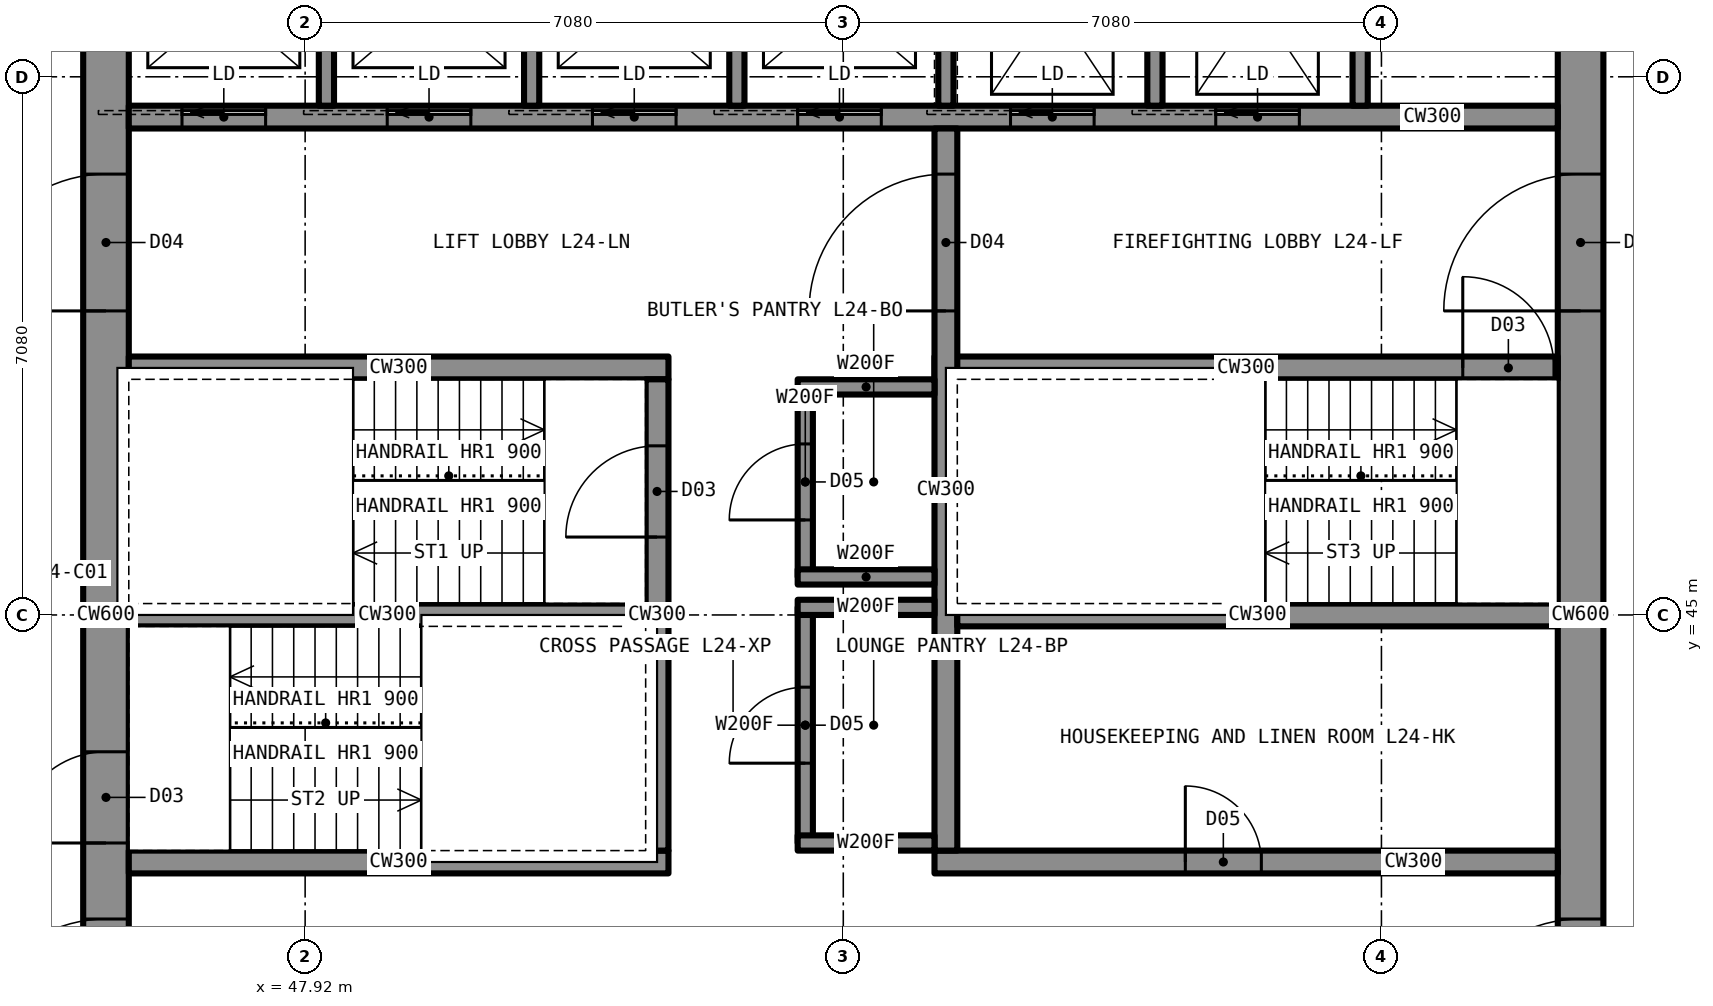
"""IFC4 building model, lengths in metres.
Left out: names, types, materials, properties, quantities, classifications, styles, units other than length and angle.
Written with IfcOpenShell. Run it as: python <this file> out.ifc"""

import sys

from ifc_helpers import new_model, si_unit, direction, frame, frame_2d, origin, place, context, subcontext, project, spatial, rectangle, extrude, element, fill, save


model = new_model("IFC4")
c1 = context("Model", 3, precision=1e-05, world=origin(), true_north=direction((0.0, 1.0)))
c2 = subcontext(c1, "Body", "Model", "MODEL_VIEW")
j1 = project(units=[si_unit("LENGTHUNIT", "METRE"), si_unit("PLANEANGLEUNIT", "RADIAN")], contexts=[c1])
p1 = place(None, origin())
s1 = spatial("IfcSite", under=j1, at=p1, CompositionType="ELEMENT")
p2 = place(p1, origin())
s2 = spatial("IfcBuilding", under=s1, at=p2, CompositionType="ELEMENT")
p3 = place(p2, frame((0.0, 0.0, 93.4)))
s3 = spatial("IfcBuildingStorey", under=s2, at=p3, CompositionType="ELEMENT", Elevation=93.4)
p4 = place(p3, frame((64.7, 35.6, 0.0), z_axis=(0.0, 0.0, 1.0), x_axis=(0.0, 1.0, 0.0)))
e1 = element("IfcWall", 1, at=p4, inside=s3, PredefinedType="SHEAR", context=c2, shape_type="SweptSolid", body=[
    extrude(rectangle(XDim=18.8, YDim=0.6, at=frame_2d((9.4, 0.0))), origin(), (0.0, 0.0, 1.0), 3.5),
])
p5 = place(p4, frame((13.4, 0.0, 0.0)))
e2 = element("IfcOpeningElement", 2, at=p5, cuts=e1, PredefinedType="OPENING", context=c2, shape_type="SweptSolid", body=[
    extrude(rectangle(XDim=1.8, YDim=2.2, at=frame_2d((0.9, 1.1))), frame((0.0, 0.31, 0.0), z_axis=(0.0, -1.0, 0.0), x_axis=(1.0, 0.0, 0.0)), (0.0, 0.0, 1.0), 0.62),
])
p6 = place(p4, frame((3.6, 0.0, 0.0)))
e3 = element("IfcOpeningElement", 3, at=p6, cuts=e1, PredefinedType="OPENING", context=c2, shape_type="SweptSolid", body=[
    extrude(rectangle(XDim=1.8, YDim=2.2, at=frame_2d((0.9, 1.1))), frame((0.0, 0.31, 0.0), z_axis=(0.0, -1.0, 0.0), x_axis=(1.0, 0.0, 0.0)), (0.0, 0.0, 1.0), 0.62),
])
p7 = place(p3, frame((45.3, 35.6, 0.0), z_axis=(0.0, 0.0, 1.0), x_axis=(0.0, 1.0, 0.0)))
e4 = element("IfcWall", 4, at=p7, inside=s3, PredefinedType="SHEAR", context=c2, shape_type="SweptSolid", body=[
    extrude(rectangle(XDim=18.8, YDim=0.6, at=frame_2d((9.4, 0.0))), origin(), (0.0, 0.0, 1.0), 3.5),
])
p8 = place(p7, frame((13.4, 0.0, 0.0)))
e5 = element("IfcOpeningElement", 5, at=p8, cuts=e4, PredefinedType="OPENING", context=c2, shape_type="SweptSolid", body=[
    extrude(rectangle(XDim=1.8, YDim=2.2, at=frame_2d((0.9, 1.1))), frame((0.0, 0.31, 0.0), z_axis=(0.0, -1.0, 0.0), x_axis=(1.0, 0.0, 0.0)), (0.0, 0.0, 1.0), 0.62),
])
p9 = place(p7, frame((3.6, 0.0, 0.0)))
e6 = element("IfcOpeningElement", 6, at=p9, cuts=e4, PredefinedType="OPENING", context=c2, shape_type="SweptSolid", body=[
    extrude(rectangle(XDim=1.8, YDim=2.2, at=frame_2d((0.9, 1.1))), frame((0.0, 0.31, 0.0), z_axis=(0.0, -1.0, 0.0), x_axis=(1.0, 0.0, 0.0)), (0.0, 0.0, 1.0), 0.62),
])
p10 = place(p7, frame((6.4, 0.0, 0.0)))
e7 = element("IfcOpeningElement", 7, at=p10, cuts=e4, PredefinedType="OPENING", context=c2, shape_type="SweptSolid", body=[
    extrude(rectangle(XDim=1.2, YDim=2.2, at=frame_2d((0.6, 1.1))), frame((0.0, 0.31, 0.0), z_axis=(0.0, -1.0, 0.0), x_axis=(1.0, 0.0, 0.0)), (0.0, 0.0, 1.0), 0.62),
])
p11 = place(p3, frame((45.6, 51.55, 0.0), z_axis=(0.0, 0.0, 1.0), x_axis=(1.0, 0.0, 0.0)))
e8 = element("IfcWall", 8, at=p11, inside=s3, PredefinedType="SHEAR", context=c2, shape_type="SweptSolid", body=[
    extrude(rectangle(XDim=18.8, YDim=0.3, at=frame_2d((9.4, 0.0))), origin(), (0.0, 0.0, 1.0), 3.5),
])
p12 = place(p11, frame((0.7, 0.0, 0.0)))
e9 = element("IfcOpeningElement", 9, at=p12, cuts=e8, PredefinedType="OPENING", context=c2, shape_type="SweptSolid", body=[
    extrude(rectangle(XDim=1.1, YDim=2.2, at=frame_2d((0.55, 1.1))), frame((0.0, 0.16, 0.0), z_axis=(0.0, -1.0, 0.0), x_axis=(1.0, 0.0, 0.0)), (0.0, 0.0, 1.0), 0.32),
])
p13 = place(p11, frame((3.4, 0.0, 0.0)))
e10 = element("IfcOpeningElement", 10, at=p13, cuts=e8, PredefinedType="OPENING", context=c2, shape_type="SweptSolid", body=[
    extrude(rectangle(XDim=1.1, YDim=2.2, at=frame_2d((0.55, 1.1))), frame((0.0, 0.16, 0.0), z_axis=(0.0, -1.0, 0.0), x_axis=(1.0, 0.0, 0.0)), (0.0, 0.0, 1.0), 0.32),
])
p14 = place(p11, frame((6.1, 0.0, 0.0)))
e11 = element("IfcOpeningElement", 11, at=p14, cuts=e8, PredefinedType="OPENING", context=c2, shape_type="SweptSolid", body=[
    extrude(rectangle(XDim=1.1, YDim=2.2, at=frame_2d((0.55, 1.1))), frame((0.0, 0.16, 0.0), z_axis=(0.0, -1.0, 0.0), x_axis=(1.0, 0.0, 0.0)), (0.0, 0.0, 1.0), 0.32),
])
p15 = place(p11, frame((8.8, 0.0, 0.0)))
e12 = element("IfcOpeningElement", 12, at=p15, cuts=e8, PredefinedType="OPENING", context=c2, shape_type="SweptSolid", body=[
    extrude(rectangle(XDim=1.1, YDim=2.2, at=frame_2d((0.55, 1.1))), frame((0.0, 0.16, 0.0), z_axis=(0.0, -1.0, 0.0), x_axis=(1.0, 0.0, 0.0)), (0.0, 0.0, 1.0), 0.32),
])
p16 = place(p11, frame((11.6, 0.0, 0.0)))
e13 = element("IfcOpeningElement", 13, at=p16, cuts=e8, PredefinedType="OPENING", context=c2, shape_type="SweptSolid", body=[
    extrude(rectangle(XDim=1.1, YDim=2.2, at=frame_2d((0.55, 1.1))), frame((0.0, 0.16, 0.0), z_axis=(0.0, -1.0, 0.0), x_axis=(1.0, 0.0, 0.0)), (0.0, 0.0, 1.0), 0.32),
])
p17 = place(p11, frame((14.3, 0.0, 0.0)))
e14 = element("IfcOpeningElement", 14, at=p17, cuts=e8, PredefinedType="OPENING", context=c2, shape_type="SweptSolid", body=[
    extrude(rectangle(XDim=1.1, YDim=2.2, at=frame_2d((0.55, 1.1))), frame((0.0, 0.16, 0.0), z_axis=(0.0, -1.0, 0.0), x_axis=(1.0, 0.0, 0.0)), (0.0, 0.0, 1.0), 0.32),
])
p18 = place(p3, frame((45.6, 48.25, 0.0), z_axis=(0.0, 0.0, 1.0), x_axis=(1.0, 0.0, 0.0)))
e15 = element("IfcWall", 15, at=p18, inside=s3, PredefinedType="SHEAR", context=c2, shape_type="SweptSolid", body=[
    extrude(rectangle(XDim=7.1, YDim=0.3, at=frame_2d((3.55, 0.0))), origin(), (0.0, 0.0, 1.0), 3.5),
])
p19 = place(p3, frame((56.2, 48.25, 0.0), z_axis=(0.0, 0.0, 1.0), x_axis=(1.0, 0.0, 0.0)))
e16 = element("IfcWall", 16, at=p19, inside=s3, PredefinedType="SHEAR", context=c2, shape_type="SweptSolid", body=[
    extrude(rectangle(XDim=8.2, YDim=0.3, at=frame_2d((4.1, 0.0))), origin(), (0.0, 0.0, 1.0), 3.5),
])
p20 = place(p19, frame((6.95, 0.0, 0.0)))
e17 = element("IfcOpeningElement", 17, at=p20, cuts=e16, PredefinedType="OPENING", context=c2, shape_type="SweptSolid", body=[
    extrude(rectangle(XDim=1.2, YDim=2.2, at=frame_2d((0.6, 1.1))), frame((0.0, 0.16, 0.0), z_axis=(0.0, -1.0, 0.0), x_axis=(1.0, 0.0, 0.0)), (0.0, 0.0, 1.0), 0.32),
])
p21 = place(p3, frame((45.6, 41.75, 0.0), z_axis=(0.0, 0.0, 1.0), x_axis=(1.0, 0.0, 0.0)))
e18 = element("IfcWall", 18, at=p21, inside=s3, PredefinedType="SHEAR", context=c2, shape_type="SweptSolid", body=[
    extrude(rectangle(XDim=7.1, YDim=0.3, at=frame_2d((3.55, 0.0))), origin(), (0.0, 0.0, 1.0), 3.5),
])
p22 = place(p3, frame((56.2, 41.75, 0.0), z_axis=(0.0, 0.0, 1.0), x_axis=(1.0, 0.0, 0.0)))
e19 = element("IfcWall", 19, at=p22, inside=s3, PredefinedType="SHEAR", context=c2, shape_type="SweptSolid", body=[
    extrude(rectangle(XDim=8.2, YDim=0.3, at=frame_2d((4.1, 0.0))), origin(), (0.0, 0.0, 1.0), 3.5),
])
p23 = place(p22, frame((3.3, 0.0, 0.0)))
e20 = element("IfcOpeningElement", 20, at=p23, cuts=e19, PredefinedType="OPENING", context=c2, shape_type="SweptSolid", body=[
    extrude(rectangle(XDim=1.0, YDim=2.1, at=frame_2d((0.5, 1.05))), frame((0.0, 0.16, 0.0), z_axis=(0.0, -1.0, 0.0), x_axis=(1.0, 0.0, 0.0)), (0.0, 0.0, 1.0), 0.32),
])
p24 = place(p3, frame((52.55, 41.9, 0.0), z_axis=(0.0, 0.0, 1.0), x_axis=(0.0, 1.0, 0.0)))
e21 = element("IfcWall", 21, at=p24, inside=s3, PredefinedType="SHEAR", context=c2, shape_type="SweptSolid", body=[
    extrude(rectangle(XDim=6.2, YDim=0.3, at=frame_2d((3.1, 0.0))), origin(), (0.0, 0.0, 1.0), 3.5),
])
p25 = place(p24, frame((4.125, 0.0, 0.0)))
e22 = element("IfcOpeningElement", 22, at=p25, cuts=e21, PredefinedType="OPENING", context=c2, shape_type="SweptSolid", body=[
    extrude(rectangle(XDim=1.2, YDim=2.2, at=frame_2d((0.6, 1.1))), frame((0.0, 0.16, 0.0), z_axis=(0.0, -1.0, 0.0), x_axis=(1.0, 0.0, 0.0)), (0.0, 0.0, 1.0), 0.32),
])
p26 = place(p3, frame((56.35, 41.9, 0.0), z_axis=(0.0, 0.0, 1.0), x_axis=(0.0, 1.0, 0.0)))
e23 = element("IfcWall", 23, at=p26, inside=s3, PredefinedType="SHEAR", context=c2, shape_type="SweptSolid", body=[
    extrude(rectangle(XDim=9.5, YDim=0.3, at=frame_2d((4.75, 0.0))), origin(), (0.0, 0.0, 1.0), 3.5),
])
p27 = place(p26, frame((7.1, 0.0, 0.0)))
e24 = element("IfcOpeningElement", 24, at=p27, cuts=e23, PredefinedType="OPENING", context=c2, shape_type="SweptSolid", body=[
    extrude(rectangle(XDim=1.8, YDim=2.2, at=frame_2d((0.9, 1.1))), frame((0.0, 0.16, 0.0), z_axis=(0.0, -1.0, 0.0), x_axis=(1.0, 0.0, 0.0)), (0.0, 0.0, 1.0), 0.32),
])
p28 = place(p3, frame((45.6, 45.0, 0.0), z_axis=(0.0, 0.0, 1.0), x_axis=(1.0, 0.0, 0.0)))
e25 = element("IfcWall", 25, at=p28, inside=s3, PredefinedType="SHEAR", context=c2, shape_type="SweptSolid", body=[
    extrude(rectangle(XDim=6.8, YDim=0.3, at=frame_2d((3.4, 0.0))), origin(), (0.0, 0.0, 1.0), 3.5),
])
p29 = place(p3, frame((56.5, 45.0, 0.0), z_axis=(0.0, 0.0, 1.0), x_axis=(1.0, 0.0, 0.0)))
e26 = element("IfcWall", 26, at=p29, inside=s3, PredefinedType="SHEAR", context=c2, shape_type="SweptSolid", body=[
    extrude(rectangle(XDim=7.9, YDim=0.3, at=frame_2d((3.95, 0.0))), origin(), (0.0, 0.0, 1.0), 3.5),
])
p30 = place(p3, frame((54.5, 42.0, 0.0), z_axis=(0.0, 0.0, 1.0), x_axis=(0.0, 1.0, 0.0)))
e27 = element("IfcWall", 27, at=p30, inside=s3, PredefinedType="PARTITIONING", context=c2, shape_type="SweptSolid", body=[
    extrude(rectangle(XDim=3.1, YDim=0.2, at=frame_2d((1.55, 0.0))), origin(), (0.0, 0.0, 1.0), 3.33),
])
p31 = place(p30, frame((1.05, 0.0, 0.0)))
e28 = element("IfcOpeningElement", 28, at=p31, cuts=e27, PredefinedType="OPENING", context=c2, shape_type="SweptSolid", body=[
    extrude(rectangle(XDim=1.0, YDim=2.1, at=frame_2d((0.5, 1.05))), frame((0.0, 0.11, 0.0), z_axis=(0.0, -1.0, 0.0), x_axis=(1.0, 0.0, 0.0)), (0.0, 0.0, 1.0), 0.22),
])
for number, where, z_axis, x_axis in (
    (29, (54.4, 42.0, 0.0), (0.0, 0.0, 1.0), (1.0, 0.0, 0.0)),
    (30, (54.4, 45.1, 0.0), (0.0, 0.0, 1.0), (1.0, 0.0, 0.0)),
):
    element("IfcWall", number, at=place(p3, frame(where, z_axis=z_axis, x_axis=x_axis)), inside=s3, PredefinedType="PARTITIONING", context=c2, shape_type="SweptSolid", body=[
        extrude(rectangle(XDim=1.8, YDim=0.2, at=frame_2d((0.9, 0.0))), origin(), (0.0, 0.0, 1.0), 3.33),
    ])
p32 = place(p3, frame((54.5, 45.5, 0.0), z_axis=(0.0, 0.0, 1.0), x_axis=(0.0, 1.0, 0.0)))
e31 = element("IfcWall", 31, at=p32, inside=s3, PredefinedType="PARTITIONING", context=c2, shape_type="SweptSolid", body=[
    extrude(rectangle(XDim=2.5, YDim=0.2, at=frame_2d((1.25, 0.0))), origin(), (0.0, 0.0, 1.0), 3.33),
])
p33 = place(p32, frame((0.75, 0.0, 0.0)))
e32 = element("IfcOpeningElement", 32, at=p33, cuts=e31, PredefinedType="OPENING", context=c2, shape_type="SweptSolid", body=[
    extrude(rectangle(XDim=1.0, YDim=2.1, at=frame_2d((0.5, 1.05))), frame((0.0, 0.11, 0.0), z_axis=(0.0, -1.0, 0.0), x_axis=(1.0, 0.0, 0.0)), (0.0, 0.0, 1.0), 0.22),
])
for number, where, z_axis, x_axis in (
    (33, (54.4, 45.5, 0.0), (0.0, 0.0, 1.0), (1.0, 0.0, 0.0)),
    (34, (54.4, 48.0, 0.0), (0.0, 0.0, 1.0), (1.0, 0.0, 0.0)),
):
    element("IfcWall", number, at=place(p3, frame(where, z_axis=z_axis, x_axis=x_axis)), inside=s3, PredefinedType="PARTITIONING", context=c2, shape_type="SweptSolid", body=[
        extrude(rectangle(XDim=1.8, YDim=0.2, at=frame_2d((0.9, 0.0))), origin(), (0.0, 0.0, 1.0), 3.33),
    ])
for number, where, z_axis, x_axis in (
    (35, (48.2, 51.7, 0.0), (0.0, 0.0, 1.0), (0.0, 1.0, 0.0)),
    (36, (50.9, 51.7, 0.0), (0.0, 0.0, 1.0), (0.0, 1.0, 0.0)),
    (37, (53.6, 51.7, 0.0), (0.0, 0.0, 1.0), (0.0, 1.0, 0.0)),
    (38, (59.1, 51.7, 0.0), (0.0, 0.0, 1.0), (0.0, 1.0, 0.0)),
    (39, (61.8, 51.7, 0.0), (0.0, 0.0, 1.0), (0.0, 1.0, 0.0)),
    (40, (56.35, 51.7, 0.0), (0.0, 0.0, 1.0), (0.0, 1.0, 0.0)),
):
    element("IfcWall", number, at=place(p3, frame(where, z_axis=z_axis, x_axis=x_axis)), inside=s3, PredefinedType="PARTITIONING", context=c2, shape_type="SweptSolid", body=[
        extrude(rectangle(XDim=2.7, YDim=0.2, at=frame_2d((1.35, 0.0))), origin(), (0.0, 0.0, 1.0), 3.33),
    ])
p34 = place(p31, origin())
e41 = element("IfcDoor", 41, at=p34, inside=s3, OperationType="SINGLE_SWING_LEFT", PredefinedType="DOOR", context=c2, shape_type="SweptSolid", body=[
    extrude(rectangle(XDim=1.0, YDim=2.1, at=frame_2d((0.5, 1.05))), frame((0.0, 0.025, 0.0), z_axis=(0.0, -1.0, 0.0), x_axis=(1.0, 0.0, 0.0)), (0.0, 0.0, 1.0), 0.05),
])
fill(e28, e41)
p35 = place(p33, origin())
e42 = element("IfcDoor", 42, at=p35, inside=s3, OperationType="SINGLE_SWING_LEFT", PredefinedType="DOOR", context=c2, shape_type="SweptSolid", body=[
    extrude(rectangle(XDim=1.0, YDim=2.1, at=frame_2d((0.5, 1.05))), frame((0.0, 0.025, 0.0), z_axis=(0.0, -1.0, 0.0), x_axis=(1.0, 0.0, 0.0)), (0.0, 0.0, 1.0), 0.05),
])
fill(e32, e42)
p36 = place(p8, origin())
e43 = element("IfcDoor", 43, at=p36, inside=s3, OperationType="DOUBLE_DOOR_SINGLE_SWING", PredefinedType="DOOR", context=c2, shape_type="SweptSolid", body=[
    extrude(rectangle(XDim=1.8, YDim=2.2, at=frame_2d((0.9, 1.1))), frame((0.0, 0.025, 0.0), z_axis=(0.0, -1.0, 0.0), x_axis=(1.0, 0.0, 0.0)), (0.0, 0.0, 1.0), 0.05),
])
fill(e5, e43)
p37 = place(p9, origin())
e44 = element("IfcDoor", 44, at=p37, inside=s3, OperationType="DOUBLE_DOOR_SINGLE_SWING", PredefinedType="DOOR", context=c2, shape_type="SweptSolid", body=[
    extrude(rectangle(XDim=1.8, YDim=2.2, at=frame_2d((0.9, 1.1))), frame((0.0, 0.025, 0.0), z_axis=(0.0, -1.0, 0.0), x_axis=(1.0, 0.0, 0.0)), (0.0, 0.0, 1.0), 0.05),
])
fill(e6, e44)
p38 = place(p5, origin())
e45 = element("IfcDoor", 45, at=p38, inside=s3, OperationType="DOUBLE_DOOR_SINGLE_SWING", PredefinedType="DOOR", context=c2, shape_type="SweptSolid", body=[
    extrude(rectangle(XDim=1.8, YDim=2.2, at=frame_2d((0.9, 1.1))), frame((0.0, 0.025, 0.0), z_axis=(0.0, -1.0, 0.0), x_axis=(1.0, 0.0, 0.0)), (0.0, 0.0, 1.0), 0.05),
])
fill(e2, e45)
p39 = place(p6, origin())
e46 = element("IfcDoor", 46, at=p39, inside=s3, OperationType="DOUBLE_DOOR_SINGLE_SWING", PredefinedType="DOOR", context=c2, shape_type="SweptSolid", body=[
    extrude(rectangle(XDim=1.8, YDim=2.2, at=frame_2d((0.9, 1.1))), frame((0.0, 0.025, 0.0), z_axis=(0.0, -1.0, 0.0), x_axis=(1.0, 0.0, 0.0)), (0.0, 0.0, 1.0), 0.05),
])
fill(e3, e46)
p40 = place(p27, origin())
e47 = element("IfcDoor", 47, at=p40, inside=s3, OperationType="DOUBLE_DOOR_SINGLE_SWING", PredefinedType="DOOR", context=c2, shape_type="SweptSolid", body=[
    extrude(rectangle(XDim=1.8, YDim=2.2, at=frame_2d((0.9, 1.1))), frame((0.0, 0.025, 0.0), z_axis=(0.0, -1.0, 0.0), x_axis=(1.0, 0.0, 0.0)), (0.0, 0.0, 1.0), 0.05),
])
fill(e24, e47)
p41 = place(p25, origin())
e48 = element("IfcDoor", 48, at=p41, inside=s3, OperationType="SINGLE_SWING_LEFT", PredefinedType="DOOR", context=c2, shape_type="SweptSolid", body=[
    extrude(rectangle(XDim=1.2, YDim=2.2, at=frame_2d((0.6, 1.1))), frame((0.0, 0.025, 0.0), z_axis=(0.0, -1.0, 0.0), x_axis=(1.0, 0.0, 0.0)), (0.0, 0.0, 1.0), 0.05),
])
fill(e22, e48)
p42 = place(p10, origin())
e49 = element("IfcDoor", 49, at=p42, inside=s3, OperationType="SINGLE_SWING_LEFT", PredefinedType="DOOR", context=c2, shape_type="SweptSolid", body=[
    extrude(rectangle(XDim=1.2, YDim=2.2, at=frame_2d((0.6, 1.1))), frame((0.0, 0.025, 0.0), z_axis=(0.0, -1.0, 0.0), x_axis=(1.0, 0.0, 0.0)), (0.0, 0.0, 1.0), 0.05),
])
fill(e7, e49)
p43 = place(p20, origin())
e50 = element("IfcDoor", 50, at=p43, inside=s3, OperationType="SINGLE_SWING_LEFT", PredefinedType="DOOR", context=c2, shape_type="SweptSolid", body=[
    extrude(rectangle(XDim=1.2, YDim=2.2, at=frame_2d((0.6, 1.1))), frame((0.0, 0.025, 0.0), z_axis=(0.0, -1.0, 0.0), x_axis=(1.0, 0.0, 0.0)), (0.0, 0.0, 1.0), 0.05),
])
fill(e17, e50)
p44 = place(p23, origin())
e51 = element("IfcDoor", 51, at=p44, inside=s3, OperationType="SINGLE_SWING_LEFT", PredefinedType="DOOR", context=c2, shape_type="SweptSolid", body=[
    extrude(rectangle(XDim=1.0, YDim=2.1, at=frame_2d((0.5, 1.05))), frame((0.0, 0.025, 0.0), z_axis=(0.0, -1.0, 0.0), x_axis=(1.0, 0.0, 0.0)), (0.0, 0.0, 1.0), 0.05),
])
fill(e20, e51)
p45 = place(p12, origin())
e52 = element("IfcDoor", 52, at=p45, inside=s3, OperationType="SLIDING_TO_LEFT", PredefinedType="DOOR", context=c2, shape_type="SweptSolid", body=[
    extrude(rectangle(XDim=1.1, YDim=2.2, at=frame_2d((0.55, 1.1))), frame((0.0, 0.025, 0.0), z_axis=(0.0, -1.0, 0.0), x_axis=(1.0, 0.0, 0.0)), (0.0, 0.0, 1.0), 0.05),
])
fill(e9, e52)
p46 = place(p13, origin())
e53 = element("IfcDoor", 53, at=p46, inside=s3, OperationType="SLIDING_TO_LEFT", PredefinedType="DOOR", context=c2, shape_type="SweptSolid", body=[
    extrude(rectangle(XDim=1.1, YDim=2.2, at=frame_2d((0.55, 1.1))), frame((0.0, 0.025, 0.0), z_axis=(0.0, -1.0, 0.0), x_axis=(1.0, 0.0, 0.0)), (0.0, 0.0, 1.0), 0.05),
])
fill(e10, e53)
p47 = place(p14, origin())
e54 = element("IfcDoor", 54, at=p47, inside=s3, OperationType="SLIDING_TO_LEFT", PredefinedType="DOOR", context=c2, shape_type="SweptSolid", body=[
    extrude(rectangle(XDim=1.1, YDim=2.2, at=frame_2d((0.55, 1.1))), frame((0.0, 0.025, 0.0), z_axis=(0.0, -1.0, 0.0), x_axis=(1.0, 0.0, 0.0)), (0.0, 0.0, 1.0), 0.05),
])
fill(e11, e54)
p48 = place(p15, origin())
e55 = element("IfcDoor", 55, at=p48, inside=s3, OperationType="SLIDING_TO_LEFT", PredefinedType="DOOR", context=c2, shape_type="SweptSolid", body=[
    extrude(rectangle(XDim=1.1, YDim=2.2, at=frame_2d((0.55, 1.1))), frame((0.0, 0.025, 0.0), z_axis=(0.0, -1.0, 0.0), x_axis=(1.0, 0.0, 0.0)), (0.0, 0.0, 1.0), 0.05),
])
fill(e12, e55)
p49 = place(p16, origin())
e56 = element("IfcDoor", 56, at=p49, inside=s3, OperationType="SLIDING_TO_LEFT", PredefinedType="DOOR", context=c2, shape_type="SweptSolid", body=[
    extrude(rectangle(XDim=1.1, YDim=2.2, at=frame_2d((0.55, 1.1))), frame((0.0, 0.025, 0.0), z_axis=(0.0, -1.0, 0.0), x_axis=(1.0, 0.0, 0.0)), (0.0, 0.0, 1.0), 0.05),
])
fill(e13, e56)
p50 = place(p17, origin())
e57 = element("IfcDoor", 57, at=p50, inside=s3, OperationType="SLIDING_TO_LEFT", PredefinedType="DOOR", context=c2, shape_type="SweptSolid", body=[
    extrude(rectangle(XDim=1.1, YDim=2.2, at=frame_2d((0.55, 1.1))), frame((0.0, 0.025, 0.0), z_axis=(0.0, -1.0, 0.0), x_axis=(1.0, 0.0, 0.0)), (0.0, 0.0, 1.0), 0.05),
])
fill(e14, e57)
save(model, sys.argv[1])
